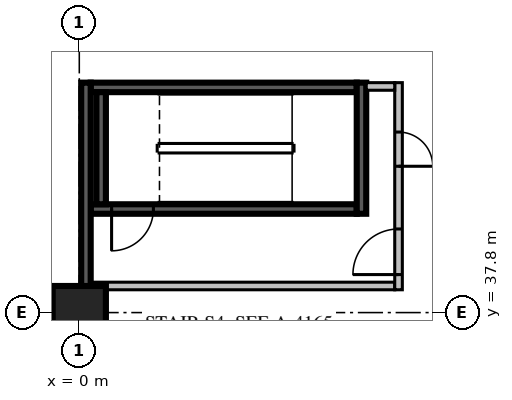
"""IFC4 building model, lengths in metres.
Left out: names, types, materials, properties, quantities, classifications, styles, units other than length and angle.
Written with IfcOpenShell. Run it as: python <this file> out.ifc"""

import sys

from ifc_helpers import new_model, si_unit, direction, frame, frame_2d, origin, origin_2d, place, context, subcontext, project, spatial, rectangle, extrude, source, transform, mapped, element, fill, save


model = new_model("IFC4")
c1 = context("Model", 3, precision=1e-05, world=origin(), true_north=direction((0.0, 1.0)))
c2 = subcontext(c1, "Body", "Model", "MODEL_VIEW")
j1 = project(units=[si_unit("LENGTHUNIT", "METRE"), si_unit("PLANEANGLEUNIT", "RADIAN")], contexts=[c1])
p1 = place(None, origin())
s1 = spatial("IfcSite", under=j1, at=p1, CompositionType="ELEMENT")
p2 = place(p1, origin())
s2 = spatial("IfcBuilding", under=s1, at=p2, CompositionType="ELEMENT")
p3 = place(p2, frame((0.0, 0.0, 12.9)))
s3 = spatial("IfcBuildingStorey", under=s2, at=p3, CompositionType="ELEMENT", Elevation=12.9)
m1 = source(origin(), c2, "Body", "SweptSolid", [
    extrude(rectangle(XDim=1.4, YDim=1.4, at=origin_2d()), origin(), (0.0, 0.0, 1.0), 5.4),
])
p4 = place(p3, frame((0.0, 37.8, 0.0), z_axis=(0.0, 0.0, 1.0), x_axis=(1.0, 0.0, 0.0)))
e1 = element("IfcColumn", 1, at=p4, inside=s3, PredefinedType="COLUMN", context=c2, shape_type="MappedRepresentation", body=[
    mapped(m1, transform((0.0, 0.0, 0.0), scale=1.0)),
])
m2 = source(origin(), c2, "Body", "SweptSolid", [
    extrude(rectangle(XDim=7.0, YDim=0.25, at=frame_2d((3.5, 0.0))), origin(), (0.0, 0.0, 1.0), 4.8),
])
p5 = place(p3, frame((0.3, 40.525, 0.0), z_axis=(0.0, 0.0, 1.0), x_axis=(1.0, 0.0, 0.0)))
e2 = element("IfcWall", 2, at=p5, inside=s3, PredefinedType="SOLIDWALL", context=c2, shape_type="MappedRepresentation", body=[
    mapped(m2, transform((0.0, 0.0, 0.0), scale=1.0)),
])
m3 = source(origin(), c2, "Body", "SweptSolid", [
    extrude(rectangle(XDim=1.1, YDim=2.1, at=frame_2d((0.55, 1.05))), frame((0.0, 0.135, 0.0), z_axis=(0.0, -1.0, 0.0), x_axis=(1.0, 0.0, 0.0)), (0.0, 0.0, 1.0), 0.27),
])
p6 = place(p5, frame((0.55, 0.0, 0.0)))
e3 = element("IfcOpeningElement", 3, at=p6, cuts=e2, PredefinedType="OPENING", context=c2, shape_type="MappedRepresentation", body=[
    mapped(m3, transform((0.0, 0.0, 0.0), scale=1.0)),
])
p7 = place(p3, frame((0.3, 43.725, 0.0), z_axis=(0.0, 0.0, 1.0), x_axis=(1.0, 0.0, 0.0)))
e4 = element("IfcWall", 4, at=p7, inside=s3, PredefinedType="SOLIDWALL", context=c2, shape_type="MappedRepresentation", body=[
    mapped(m2, transform((0.0, 0.0, 0.0), scale=1.0)),
])
m4 = source(origin(), c2, "Body", "SweptSolid", [
    extrude(rectangle(XDim=3.45, YDim=0.25, at=frame_2d((1.725, 0.0))), origin(), (0.0, 0.0, 1.0), 4.8),
])
p8 = place(p3, frame((7.425, 40.4, 0.0), z_axis=(0.0, 0.0, 1.0), x_axis=(0.0, 1.0, 0.0)))
e5 = element("IfcWall", 5, at=p8, inside=s3, PredefinedType="SOLIDWALL", context=c2, shape_type="MappedRepresentation", body=[
    mapped(m4, transform((0.0, 0.0, 0.0), scale=1.0)),
])
m5 = source(origin(), c2, "Body", "SweptSolid", [
    extrude(rectangle(XDim=2.95, YDim=0.25, at=frame_2d((1.475, 0.0))), origin(), (0.0, 0.0, 1.0), 4.8),
])
p9 = place(p3, frame((0.575, 40.65, 0.0), z_axis=(0.0, 0.0, 1.0), x_axis=(0.0, 1.0, 0.0)))
e6 = element("IfcWall", 6, at=p9, inside=s3, PredefinedType="SOLIDWALL", context=c2, shape_type="MappedRepresentation", body=[
    mapped(m5, transform((0.0, 0.0, 0.0), scale=1.0)),
])
m6 = source(origin(), c2, "Body", "SweptSolid", [
    extrude(rectangle(XDim=8.0, YDim=0.2, at=frame_2d((4.0, 0.0))), origin(), (0.0, 0.0, 1.0), 4.8),
])
p10 = place(p3, frame((0.3, 38.5, 0.0), z_axis=(0.0, 0.0, 1.0), x_axis=(1.0, 0.0, 0.0)))
e7 = element("IfcWall", 7, at=p10, inside=s3, PredefinedType="PARTITIONING", context=c2, shape_type="MappedRepresentation", body=[
    mapped(m6, transform((0.0, 0.0, 0.0), scale=1.0)),
])
m7 = source(origin(), c2, "Body", "SweptSolid", [
    extrude(rectangle(XDim=5.45, YDim=0.2, at=frame_2d((2.725, 0.0))), origin(), (0.0, 0.0, 1.0), 4.8),
])
p11 = place(p3, frame((8.4, 38.4, 0.0), z_axis=(0.0, 0.0, 1.0), x_axis=(0.0, 1.0, 0.0)))
e8 = element("IfcWall", 8, at=p11, inside=s3, PredefinedType="PARTITIONING", context=c2, shape_type="MappedRepresentation", body=[
    mapped(m7, transform((0.0, 0.0, 0.0), scale=1.0)),
])
m8 = source(origin(), c2, "Body", "SweptSolid", [
    extrude(rectangle(XDim=1.2, YDim=2.1, at=frame_2d((0.6, 1.05))), frame((0.0, 0.11, 0.0), z_axis=(0.0, -1.0, 0.0), x_axis=(1.0, 0.0, 0.0)), (0.0, 0.0, 1.0), 0.22),
])
p12 = place(p11, frame((0.4, 0.0, 0.0)))
e9 = element("IfcOpeningElement", 9, at=p12, cuts=e8, PredefinedType="OPENING", context=c2, shape_type="MappedRepresentation", body=[
    mapped(m8, transform((0.0, 0.0, 0.0), scale=1.0)),
])
m9 = source(origin(), c2, "Body", "SweptSolid", [
    extrude(rectangle(XDim=0.9, YDim=2.1, at=frame_2d((0.45, 1.05))), frame((0.0, 0.11, 0.0), z_axis=(0.0, -1.0, 0.0), x_axis=(1.0, 0.0, 0.0)), (0.0, 0.0, 1.0), 0.22),
])
p13 = place(p11, frame((3.25, 0.0, 0.0)))
e10 = element("IfcOpeningElement", 10, at=p13, cuts=e8, PredefinedType="OPENING", context=c2, shape_type="MappedRepresentation", body=[
    mapped(m9, transform((0.0, 0.0, 0.0), scale=1.0)),
])
m10 = source(origin(), c2, "Body", "SweptSolid", [
    extrude(rectangle(XDim=0.75, YDim=0.2, at=frame_2d((0.375, 0.0))), origin(), (0.0, 0.0, 1.0), 4.8),
])
p14 = place(p3, frame((7.55, 43.75, 0.0), z_axis=(0.0, 0.0, 1.0), x_axis=(1.0, 0.0, 0.0)))
e11 = element("IfcWall", 11, at=p14, inside=s3, PredefinedType="PARTITIONING", context=c2, shape_type="MappedRepresentation", body=[
    mapped(m10, transform((0.0, 0.0, 0.0), scale=1.0)),
])
m11 = source(origin(), c2, "Body", "SweptSolid", [
    extrude(rectangle(XDim=5.45, YDim=0.25, at=frame_2d((2.725, 0.0))), origin(), (0.0, 0.0, 1.0), 4.8),
])
p15 = place(p3, frame((0.175, 38.4, 0.0), z_axis=(0.0, 0.0, 1.0), x_axis=(0.0, 1.0, 0.0)))
e12 = element("IfcWall", 12, at=p15, inside=s3, PredefinedType="SOLIDWALL", context=c2, shape_type="MappedRepresentation", body=[
    mapped(m11, transform((0.0, 0.0, 0.0), scale=1.0)),
])
m12 = source(origin(), c2, "Body", "SweptSolid", [
    extrude(rectangle(XDim=1.1, YDim=2.1, at=frame_2d((0.55, 1.05))), frame((0.0, 0.025, 0.0), z_axis=(0.0, -1.0, 0.0), x_axis=(1.0, 0.0, 0.0)), (0.0, 0.0, 1.0), 0.05),
])
p16 = place(p6, origin())
e13 = element("IfcDoor", 13, at=p16, inside=s3, OperationType="SINGLE_SWING_RIGHT", PredefinedType="DOOR", context=c2, shape_type="MappedRepresentation", body=[
    mapped(m12, transform((0.0, 0.0, 0.0), scale=1.0)),
])
fill(e3, e13)
m13 = source(origin(), c2, "Body", "SweptSolid", [
    extrude(rectangle(XDim=1.2, YDim=2.1, at=frame_2d((0.6, 1.05))), frame((0.0, 0.025, 0.0), z_axis=(0.0, -1.0, 0.0), x_axis=(1.0, 0.0, 0.0)), (0.0, 0.0, 1.0), 0.05),
])
p17 = place(p12, origin())
e14 = element("IfcDoor", 14, at=p17, inside=s3, OperationType="SINGLE_SWING_LEFT", PredefinedType="DOOR", context=c2, shape_type="MappedRepresentation", body=[
    mapped(m13, transform((0.0, 0.0, 0.0), scale=1.0)),
])
fill(e9, e14)
m14 = source(origin(), c2, "Body", "SweptSolid", [
    extrude(rectangle(XDim=0.9, YDim=2.1, at=frame_2d((0.45, 1.05))), frame((0.0, 0.025, 0.0), z_axis=(0.0, -1.0, 0.0), x_axis=(1.0, 0.0, 0.0)), (0.0, 0.0, 1.0), 0.05),
])
p18 = place(p13, origin())
e15 = element("IfcDoor", 15, at=p18, inside=s3, OperationType="SINGLE_SWING_RIGHT", PredefinedType="DOOR", context=c2, shape_type="MappedRepresentation", body=[
    mapped(m14, transform((0.0, 0.0, 0.0), scale=1.0)),
])
fill(e10, e15)
save(model, sys.argv[1])
